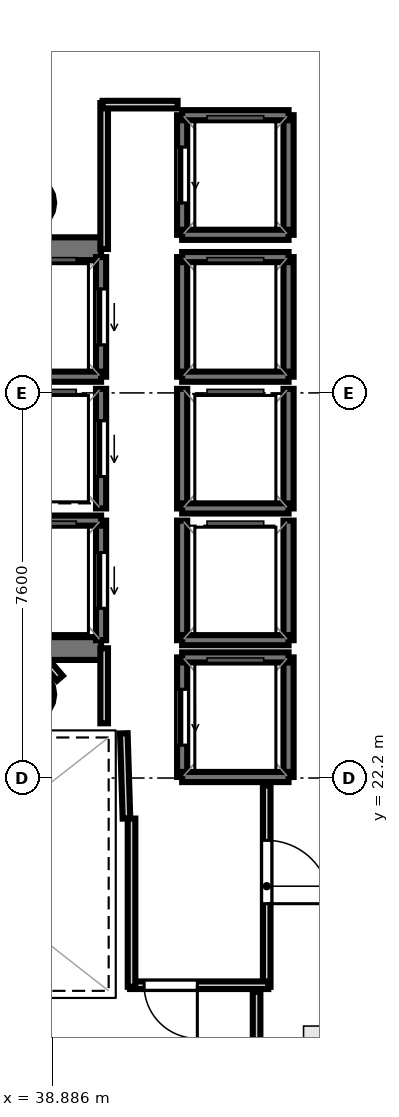
"""IFC4 building model, lengths in metres.
Left out: names, types, materials, properties, quantities, classifications, styles, units other than length and angle.
Written with IfcOpenShell. Run it as: python <this file> out.ifc"""

import sys

from ifc_helpers import new_model, si_unit, direction, frame, frame_2d, origin, origin_2d, place, context, subcontext, project, spatial, rectangle, hollow_circle, extrude, element, fill, save


model = new_model("IFC4")
c1 = context("Model", 3, precision=1e-05, world=origin(), true_north=direction((0.0, 1.0)))
c2 = subcontext(c1, "Body", "Model", "MODEL_VIEW")
j1 = project(units=[si_unit("LENGTHUNIT", "METRE"), si_unit("PLANEANGLEUNIT", "RADIAN")], contexts=[c1])
p1 = place(None, origin())
s1 = spatial("IfcSite", under=j1, at=p1, CompositionType="ELEMENT")
p2 = place(p1, origin())
s2 = spatial("IfcBuilding", under=s1, at=p2, CompositionType="ELEMENT")
p3 = place(p2, frame((0.0, 0.0, 239.0)))
s3 = spatial("IfcBuildingStorey", under=s2, at=p3, CompositionType="ELEMENT", Elevation=239.0)
p4 = place(p3, frame((29.33, 32.645, 0.0), z_axis=(0.0, 0.0, 1.0), x_axis=(1.0, 0.0, 0.0)))
e1 = element("IfcWall", 1, at=p4, inside=s3, PredefinedType="SHEAR", context=c2, shape_type="SweptSolid", body=[
    extrude(rectangle(XDim=10.52, YDim=0.45, at=frame_2d((5.26, 0.0))), origin(), (0.0, 0.0, 1.0), 3.52),
])
p5 = place(p4, frame((0.895, 0.0, 0.0)))
e2 = element("IfcOpeningElement", 2, at=p5, cuts=e1, PredefinedType="OPENING", context=c2, shape_type="SweptSolid", body=[
    extrude(rectangle(XDim=1.25, YDim=2.15, at=frame_2d((0.625, 1.075))), frame((0.0, 0.235, 0.0), z_axis=(0.0, -1.0, 0.0), x_axis=(1.0, 0.0, 0.0)), (0.0, 0.0, 1.0), 0.47),
])
p6 = place(p3, frame((29.33, 24.755, 0.0), z_axis=(0.0, 0.0, 1.0), x_axis=(1.0, 0.0, 0.0)))
e3 = element("IfcWall", 3, at=p6, inside=s3, PredefinedType="SHEAR", context=c2, shape_type="SweptSolid", body=[
    extrude(rectangle(XDim=10.52, YDim=0.45, at=frame_2d((5.26, 0.0))), origin(), (0.0, 0.0, 1.0), 3.52),
])
p7 = place(p6, frame((0.695, 0.0, 0.0)))
e4 = element("IfcOpeningElement", 4, at=p7, cuts=e3, PredefinedType="OPENING", context=c2, shape_type="SweptSolid", body=[
    extrude(rectangle(XDim=1.25, YDim=2.15, at=frame_2d((0.625, 1.075))), frame((0.0, 0.235, 0.0), z_axis=(0.0, -1.0, 0.0), x_axis=(1.0, 0.0, 0.0)), (0.0, 0.0, 1.0), 0.47),
])
for number, where, z_axis, x_axis in (
    (5, (38.4, 33.55, 0.0), (0.0, 0.0, 1.0), (1.0, 0.0, 0.0)),
    (6, (38.4, 23.85, 0.0), (0.0, 0.0, 1.0), (1.0, 0.0, 0.0)),
):
    element("IfcColumn", number, at=place(p3, frame(where, z_axis=z_axis, x_axis=x_axis)), inside=s3, PredefinedType="COLUMN", context=c2, shape_type="SweptSolid", body=[
        extrude(hollow_circle(Radius=0.525, WallThickness=0.028, at=origin_2d()), origin(), (0.0, 0.0, 1.0), 3.7),
    ])
p8 = place(p3, frame((39.85, 30.12, 0.0), z_axis=(0.0, 0.0, 1.0), x_axis=(0.0, 1.0, 0.0)))
e7 = element("IfcWall", 7, at=p8, inside=s3, PredefinedType="SOLIDWALL", context=c2, shape_type="SweptSolid", body=[
    extrude(rectangle(XDim=2.36, YDim=0.2, at=frame_2d((1.18, 0.0))), origin(), (0.0, 0.0, 1.0), 3.52),
])
p9 = place(p8, frame((0.63, 0.0, 0.0)))
e8 = element("IfcOpeningElement", 8, at=p9, cuts=e7, PredefinedType="OPENING", context=c2, shape_type="SweptSolid", body=[
    extrude(rectangle(XDim=1.1, YDim=2.15, at=frame_2d((0.55, 1.075))), frame((0.0, 0.11, 0.0), z_axis=(0.0, -1.0, 0.0), x_axis=(1.0, 0.0, 0.0)), (0.0, 0.0, 1.0), 0.22),
])
p10 = place(p3, frame((37.75, 30.12, 0.0), z_axis=(0.0, 0.0, 1.0), x_axis=(1.0, 0.0, 0.0)))
e9 = element("IfcWall", 9, at=p10, inside=s3, PredefinedType="SOLIDWALL", context=c2, shape_type="SweptSolid", body=[
    extrude(rectangle(XDim=2.1, YDim=0.2, at=frame_2d((1.05, 0.0))), origin(), (0.0, 0.0, 1.0), 3.52),
])
p11 = place(p3, frame((39.85, 24.92, 0.0), z_axis=(0.0, 0.0, 1.0), x_axis=(0.0, 1.0, 0.0)))
e10 = element("IfcWall", 10, at=p11, inside=s3, PredefinedType="SOLIDWALL", context=c2, shape_type="SweptSolid", body=[
    extrude(rectangle(XDim=2.36, YDim=0.2, at=frame_2d((1.18, 0.0))), origin(), (0.0, 0.0, 1.0), 3.52),
])
p12 = place(p11, frame((0.63, 0.0, 0.0)))
e11 = element("IfcOpeningElement", 11, at=p12, cuts=e10, PredefinedType="OPENING", context=c2, shape_type="SweptSolid", body=[
    extrude(rectangle(XDim=1.1, YDim=2.15, at=frame_2d((0.55, 1.075))), frame((0.0, 0.11, 0.0), z_axis=(0.0, -1.0, 0.0), x_axis=(1.0, 0.0, 0.0)), (0.0, 0.0, 1.0), 0.22),
])
p13 = place(p3, frame((37.75, 27.28, 0.0), z_axis=(0.0, 0.0, 1.0), x_axis=(1.0, 0.0, 0.0)))
e12 = element("IfcWall", 12, at=p13, inside=s3, PredefinedType="SOLIDWALL", context=c2, shape_type="SweptSolid", body=[
    extrude(rectangle(XDim=2.1, YDim=0.2, at=frame_2d((1.05, 0.0))), origin(), (0.0, 0.0, 1.0), 3.52),
])
for number, where, z_axis, x_axis in (
    (13, (43.55, 30.12, 0.0), (0.0, 0.0, 1.0), (0.0, 1.0, 0.0)),
    (14, (41.45, 30.12, 0.0), (0.0, 0.0, 1.0), (0.0, 1.0, 0.0)),
):
    element("IfcWall", number, at=place(p3, frame(where, z_axis=z_axis, x_axis=x_axis)), inside=s3, PredefinedType="SOLIDWALL", context=c2, shape_type="SweptSolid", body=[
        extrude(rectangle(XDim=2.36, YDim=0.2, at=frame_2d((1.18, 0.0))), origin(), (0.0, 0.0, 1.0), 3.52),
    ])
for number, where, z_axis, x_axis in (
    (15, (41.45, 32.48, 0.0), (0.0, 0.0, 1.0), (1.0, 0.0, 0.0)),
    (16, (41.45, 30.12, 0.0), (0.0, 0.0, 1.0), (1.0, 0.0, 0.0)),
):
    element("IfcWall", number, at=place(p3, frame(where, z_axis=z_axis, x_axis=x_axis)), inside=s3, PredefinedType="SOLIDWALL", context=c2, shape_type="SweptSolid", body=[
        extrude(rectangle(XDim=2.1, YDim=0.2, at=frame_2d((1.05, 0.0))), origin(), (0.0, 0.0, 1.0), 3.52),
    ])
for number, where, z_axis, x_axis in (
    (17, (43.55, 27.52, 0.0), (0.0, 0.0, 1.0), (0.0, 1.0, 0.0)),
    (18, (41.45, 27.52, 0.0), (0.0, 0.0, 1.0), (0.0, 1.0, 0.0)),
):
    element("IfcWall", number, at=place(p3, frame(where, z_axis=z_axis, x_axis=x_axis)), inside=s3, PredefinedType="SOLIDWALL", context=c2, shape_type="SweptSolid", body=[
        extrude(rectangle(XDim=2.36, YDim=0.2, at=frame_2d((1.18, 0.0))), origin(), (0.0, 0.0, 1.0), 3.52),
    ])
p14 = place(p3, frame((41.45, 27.52, 0.0), z_axis=(0.0, 0.0, 1.0), x_axis=(1.0, 0.0, 0.0)))
e19 = element("IfcWall", 19, at=p14, inside=s3, PredefinedType="SOLIDWALL", context=c2, shape_type="SweptSolid", body=[
    extrude(rectangle(XDim=2.1, YDim=0.2, at=frame_2d((1.05, 0.0))), origin(), (0.0, 0.0, 1.0), 3.52),
])
for number, where, z_axis, x_axis in (
    (20, (43.55, 24.92, 0.0), (0.0, 0.0, 1.0), (0.0, 1.0, 0.0)),
    (21, (41.45, 24.92, 0.0), (0.0, 0.0, 1.0), (0.0, 1.0, 0.0)),
):
    element("IfcWall", number, at=place(p3, frame(where, z_axis=z_axis, x_axis=x_axis)), inside=s3, PredefinedType="SOLIDWALL", context=c2, shape_type="SweptSolid", body=[
        extrude(rectangle(XDim=2.36, YDim=0.2, at=frame_2d((1.18, 0.0))), origin(), (0.0, 0.0, 1.0), 3.52),
    ])
p15 = place(p3, frame((41.45, 24.92, 0.0), z_axis=(0.0, 0.0, 1.0), x_axis=(1.0, 0.0, 0.0)))
e22 = element("IfcWall", 22, at=p15, inside=s3, PredefinedType="SOLIDWALL", context=c2, shape_type="SweptSolid", body=[
    extrude(rectangle(XDim=2.1, YDim=0.2, at=frame_2d((1.05, 0.0))), origin(), (0.0, 0.0, 1.0), 3.52),
])
p16 = place(p3, frame((39.85, 27.52, 0.0), z_axis=(0.0, 0.0, 1.0), x_axis=(0.0, 1.0, 0.0)))
e23 = element("IfcWall", 23, at=p16, inside=s3, PredefinedType="SOLIDWALL", context=c2, shape_type="SweptSolid", body=[
    extrude(rectangle(XDim=2.36, YDim=0.2, at=frame_2d((1.18, 0.0))), origin(), (0.0, 0.0, 1.0), 3.52),
])
p17 = place(p16, frame((0.63, 0.0, 0.0)))
e24 = element("IfcOpeningElement", 24, at=p17, cuts=e23, PredefinedType="OPENING", context=c2, shape_type="SweptSolid", body=[
    extrude(rectangle(XDim=1.1, YDim=2.15, at=frame_2d((0.55, 1.075))), frame((0.0, 0.11, 0.0), z_axis=(0.0, -1.0, 0.0), x_axis=(1.0, 0.0, 0.0)), (0.0, 0.0, 1.0), 0.22),
])
p18 = place(p3, frame((43.55, 22.22, 0.0), z_axis=(0.0, 0.0, 1.0), x_axis=(0.0, 1.0, 0.0)))
e25 = element("IfcWall", 25, at=p18, inside=s3, PredefinedType="SOLIDWALL", context=c2, shape_type="SweptSolid", body=[
    extrude(rectangle(XDim=2.36, YDim=0.2, at=frame_2d((1.18, 0.0))), origin(), (0.0, 0.0, 1.0), 3.52),
])
p19 = place(p3, frame((41.45, 22.22, 0.0), z_axis=(0.0, 0.0, 1.0), x_axis=(0.0, 1.0, 0.0)))
e26 = element("IfcWall", 26, at=p19, inside=s3, PredefinedType="SOLIDWALL", context=c2, shape_type="SweptSolid", body=[
    extrude(rectangle(XDim=2.36, YDim=0.2, at=frame_2d((1.18, 0.0))), origin(), (0.0, 0.0, 1.0), 3.52),
])
p20 = place(p19, frame((0.63, 0.0, 0.0)))
e27 = element("IfcOpeningElement", 27, at=p20, cuts=e26, PredefinedType="OPENING", context=c2, shape_type="SweptSolid", body=[
    extrude(rectangle(XDim=1.1, YDim=2.15, at=frame_2d((0.55, 1.075))), frame((0.0, 0.11, 0.0), z_axis=(0.0, -1.0, 0.0), x_axis=(1.0, 0.0, 0.0)), (0.0, 0.0, 1.0), 0.22),
])
for number, where, z_axis, x_axis in (
    (28, (41.45, 24.58, 0.0), (0.0, 0.0, 1.0), (1.0, 0.0, 0.0)),
    (29, (41.45, 22.22, 0.0), (0.0, 0.0, 1.0), (1.0, 0.0, 0.0)),
):
    element("IfcWall", number, at=place(p3, frame(where, z_axis=z_axis, x_axis=x_axis)), inside=s3, PredefinedType="SOLIDWALL", context=c2, shape_type="SweptSolid", body=[
        extrude(rectangle(XDim=2.1, YDim=0.2, at=frame_2d((1.05, 0.0))), origin(), (0.0, 0.0, 1.0), 3.52),
    ])
p21 = place(p3, frame((43.55, 32.92, 0.0), z_axis=(0.0, 0.0, 1.0), x_axis=(0.0, 1.0, 0.0)))
e30 = element("IfcWall", 30, at=p21, inside=s3, PredefinedType="SOLIDWALL", context=c2, shape_type="SweptSolid", body=[
    extrude(rectangle(XDim=2.36, YDim=0.2, at=frame_2d((1.18, 0.0))), origin(), (0.0, 0.0, 1.0), 3.52),
])
p22 = place(p3, frame((41.45, 32.92, 0.0), z_axis=(0.0, 0.0, 1.0), x_axis=(0.0, 1.0, 0.0)))
e31 = element("IfcWall", 31, at=p22, inside=s3, PredefinedType="SOLIDWALL", context=c2, shape_type="SweptSolid", body=[
    extrude(rectangle(XDim=2.36, YDim=0.2, at=frame_2d((1.18, 0.0))), origin(), (0.0, 0.0, 1.0), 3.52),
])
p23 = place(p22, frame((0.63, 0.0, 0.0)))
e32 = element("IfcOpeningElement", 32, at=p23, cuts=e31, PredefinedType="OPENING", context=c2, shape_type="SweptSolid", body=[
    extrude(rectangle(XDim=1.1, YDim=2.15, at=frame_2d((0.55, 1.075))), frame((0.0, 0.11, 0.0), z_axis=(0.0, -1.0, 0.0), x_axis=(1.0, 0.0, 0.0)), (0.0, 0.0, 1.0), 0.22),
])
for number, where, z_axis, x_axis in (
    (33, (41.45, 35.28, 0.0), (0.0, 0.0, 1.0), (1.0, 0.0, 0.0)),
    (34, (41.45, 32.92, 0.0), (0.0, 0.0, 1.0), (1.0, 0.0, 0.0)),
):
    element("IfcWall", number, at=place(p3, frame(where, z_axis=z_axis, x_axis=x_axis)), inside=s3, PredefinedType="SOLIDWALL", context=c2, shape_type="SweptSolid", body=[
        extrude(rectangle(XDim=2.1, YDim=0.2, at=frame_2d((1.05, 0.0))), origin(), (0.0, 0.0, 1.0), 3.52),
    ])
p24 = place(p3, frame((40.351, 21.401, 0.0), z_axis=(0.0, 0.0, 1.0), x_axis=(-0.031058045979, 0.999517582527, 0.0)))
e35 = element("IfcWall", 35, at=p24, inside=s3, PredefinedType="PARTITIONING", context=c2, shape_type="SweptSolid", body=[
    extrude(rectangle(XDim=1.682, YDim=0.15, at=frame_2d((0.841, 0.0))), origin(), (0.0, 0.0, 1.0), 2.84),
])
p25 = place(p3, frame((39.911, 23.28, 0.0), z_axis=(0.0, 0.0, 1.0), x_axis=(0.0, 1.0, 0.0)))
e36 = element("IfcWall", 36, at=p25, inside=s3, PredefinedType="PARTITIONING", context=c2, shape_type="SweptSolid", body=[
    extrude(rectangle(XDim=1.48, YDim=0.15, at=frame_2d((0.74, 0.0))), origin(), (0.0, 0.0, 1.0), 2.84),
])
p26 = place(p3, frame((39.911, 32.64, 0.0), z_axis=(0.0, 0.0, 1.0), x_axis=(0.0, 1.0, 0.0)))
e37 = element("IfcWall", 37, at=p26, inside=s3, PredefinedType="PARTITIONING", context=c2, shape_type="SweptSolid", body=[
    extrude(rectangle(XDim=2.88, YDim=0.15, at=frame_2d((1.44, 0.0))), origin(), (0.0, 0.0, 1.0), 2.84),
])
p27 = place(p3, frame((39.88, 35.489, 0.0), z_axis=(0.0, 0.0, 1.0), x_axis=(1.0, 0.0, 0.0)))
e38 = element("IfcWall", 38, at=p27, inside=s3, PredefinedType="PARTITIONING", context=c2, shape_type="SweptSolid", body=[
    extrude(rectangle(XDim=1.48, YDim=0.15, at=frame_2d((0.74, 0.0))), origin(), (0.0, 0.0, 1.0), 2.84),
])
p28 = place(p3, frame((43.119, 22.05, 0.0), z_axis=(0.0, 0.0, 1.0), x_axis=(0.0, -1.0, 0.0)))
e39 = element("IfcWall", 39, at=p28, inside=s3, PredefinedType="PARTITIONING", context=c2, shape_type="SweptSolid", body=[
    extrude(rectangle(XDim=3.97, YDim=0.15, at=frame_2d((1.985, 0.0))), origin(), (0.0, 0.0, 1.0), 2.84),
])
p29 = place(p28, frame((1.08, 0.0, 0.0)))
e40 = element("IfcOpeningElement", 40, at=p29, cuts=e39, PredefinedType="OPENING", context=c2, shape_type="SweptSolid", body=[
    extrude(rectangle(XDim=1.25, YDim=2.2, at=frame_2d((0.625, 1.1))), frame((0.0, 0.085, 0.0), z_axis=(0.0, -1.0, 0.0), x_axis=(1.0, 0.0, 0.0)), (0.0, 0.0, 1.0), 0.17),
])
p30 = place(p3, frame((43.15, 18.111, 0.0), z_axis=(0.0, 0.0, 1.0), x_axis=(-1.0, 0.0, 0.0)))
e41 = element("IfcWall", 41, at=p30, inside=s3, PredefinedType="PARTITIONING", context=c2, shape_type="SweptSolid", body=[
    extrude(rectangle(XDim=2.73, YDim=0.15, at=frame_2d((1.365, 0.0))), origin(), (0.0, 0.0, 1.0), 2.84),
])
p31 = place(p30, frame((1.4, 0.0, 0.0)))
e42 = element("IfcOpeningElement", 42, at=p31, cuts=e41, PredefinedType="OPENING", context=c2, shape_type="SweptSolid", body=[
    extrude(rectangle(XDim=1.05, YDim=2.15, at=frame_2d((0.525, 1.075))), frame((0.0, 0.085, 0.0), z_axis=(0.0, -1.0, 0.0), x_axis=(1.0, 0.0, 0.0)), (0.0, 0.0, 1.0), 0.17),
])
p32 = place(p3, frame((40.451, 18.08, 0.0), z_axis=(0.0, 0.0, 1.0), x_axis=(0.0, 1.0, 0.0)))
e43 = element("IfcWall", 43, at=p32, inside=s3, PredefinedType="PARTITIONING", context=c2, shape_type="SweptSolid", body=[
    extrude(rectangle(XDim=3.32, YDim=0.15, at=frame_2d((1.66, 0.0))), origin(), (0.0, 0.0, 1.0), 2.84),
])
p33 = place(p3, frame((39.036, 24.17, 0.0), z_axis=(0.0, 0.0, 1.0), x_axis=(-0.652260263346, 0.757995084984, 0.0)))
e44 = element("IfcWall", 44, at=p33, inside=s3, PredefinedType="PARTITIONING", context=c2, shape_type="SweptSolid", body=[
    extrude(rectangle(XDim=0.355, YDim=0.15, at=frame_2d((0.178, 0.0))), origin(), (0.0, 0.0, 1.0), 2.84),
])
p34 = place(p3, frame((42.919, 17.98, 0.0), z_axis=(0.0, 0.0, 1.0), x_axis=(0.0, -1.0, 0.0)))
e45 = element("IfcWall", 45, at=p34, inside=s3, PredefinedType="PARTITIONING", context=c2, shape_type="SweptSolid", body=[
    extrude(rectangle(XDim=2.741, YDim=0.15, at=frame_2d((1.371, 0.0))), origin(), (0.0, 0.0, 1.0), 2.84),
])
p35 = place(p3, frame((39.64, 37.059, 0.0), z_axis=(0.0, 0.0, 1.0), x_axis=(0.997065320003, -0.07655552003, 0.0)))
e46 = element("IfcWall", 46, at=p35, inside=s3, PredefinedType="PARTITIONING", context=c2, shape_type="SweptSolid", body=[
    extrude(rectangle(XDim=17.878, YDim=0.12, at=frame_2d((8.939, 0.0))), origin(), (0.0, 0.0, 1.0), 2.84),
])
p36 = place(p9, origin())
e47 = element("IfcDoor", 47, at=p36, inside=s3, OperationType="SLIDING_TO_LEFT", PredefinedType="DOOR", context=c2, shape_type="SweptSolid", body=[
    extrude(rectangle(XDim=1.1, YDim=2.15, at=frame_2d((0.55, 1.075))), frame((0.0, 0.025, 0.0), z_axis=(0.0, -1.0, 0.0), x_axis=(1.0, 0.0, 0.0)), (0.0, 0.0, 1.0), 0.05),
])
fill(e8, e47)
p37 = place(p12, origin())
e48 = element("IfcDoor", 48, at=p37, inside=s3, OperationType="SLIDING_TO_LEFT", PredefinedType="DOOR", context=c2, shape_type="SweptSolid", body=[
    extrude(rectangle(XDim=1.1, YDim=2.15, at=frame_2d((0.55, 1.075))), frame((0.0, 0.025, 0.0), z_axis=(0.0, -1.0, 0.0), x_axis=(1.0, 0.0, 0.0)), (0.0, 0.0, 1.0), 0.05),
])
fill(e11, e48)
p38 = place(p17, origin())
e49 = element("IfcDoor", 49, at=p38, inside=s3, OperationType="SLIDING_TO_LEFT", PredefinedType="DOOR", context=c2, shape_type="SweptSolid", body=[
    extrude(rectangle(XDim=1.1, YDim=2.15, at=frame_2d((0.55, 1.075))), frame((0.0, 0.025, 0.0), z_axis=(0.0, -1.0, 0.0), x_axis=(1.0, 0.0, 0.0)), (0.0, 0.0, 1.0), 0.05),
])
fill(e24, e49)
p39 = place(p20, origin())
e50 = element("IfcDoor", 50, at=p39, inside=s3, OperationType="SLIDING_TO_LEFT", PredefinedType="DOOR", context=c2, shape_type="SweptSolid", body=[
    extrude(rectangle(XDim=1.1, YDim=2.15, at=frame_2d((0.55, 1.075))), frame((0.0, 0.025, 0.0), z_axis=(0.0, -1.0, 0.0), x_axis=(1.0, 0.0, 0.0)), (0.0, 0.0, 1.0), 0.05),
])
fill(e27, e50)
p40 = place(p23, origin())
e51 = element("IfcDoor", 51, at=p40, inside=s3, OperationType="SLIDING_TO_LEFT", PredefinedType="DOOR", context=c2, shape_type="SweptSolid", body=[
    extrude(rectangle(XDim=1.1, YDim=2.15, at=frame_2d((0.55, 1.075))), frame((0.0, 0.025, 0.0), z_axis=(0.0, -1.0, 0.0), x_axis=(1.0, 0.0, 0.0)), (0.0, 0.0, 1.0), 0.05),
])
fill(e32, e51)
p41 = place(p31, origin())
e52 = element("IfcDoor", 52, at=p41, inside=s3, OperationType="SINGLE_SWING_LEFT", PredefinedType="DOOR", context=c2, shape_type="SweptSolid", body=[
    extrude(rectangle(XDim=1.05, YDim=2.15, at=frame_2d((0.525, 1.075))), frame((0.0, 0.025, 0.0), z_axis=(0.0, -1.0, 0.0), x_axis=(1.0, 0.0, 0.0)), (0.0, 0.0, 1.0), 0.05),
])
fill(e42, e52)
p42 = place(p29, origin())
e53 = element("IfcDoor", 53, at=p42, inside=s3, OperationType="SINGLE_SWING_RIGHT", PredefinedType="DOOR", context=c2, shape_type="SweptSolid", body=[
    extrude(rectangle(XDim=1.25, YDim=2.2, at=frame_2d((0.625, 1.1))), frame((0.0, 0.025, 0.0), z_axis=(0.0, -1.0, 0.0), x_axis=(1.0, 0.0, 0.0)), (0.0, 0.0, 1.0), 0.05),
])
fill(e40, e53)
save(model, sys.argv[1])
